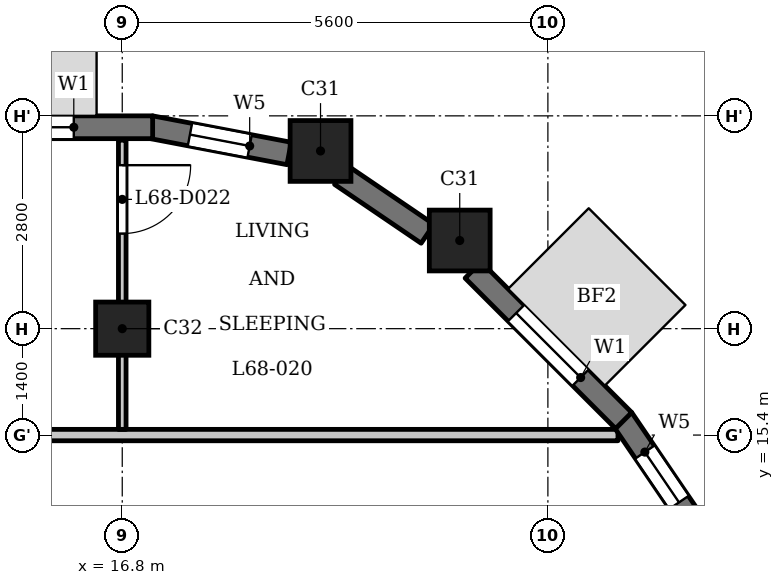
"""IFC4 building model, lengths in metres.
Left out: names, types, materials, properties, quantities, classifications, styles, units other than length and angle.
Written with IfcOpenShell. Run it as: python <this file> out.ifc"""

import sys

from ifc_helpers import new_model, si_unit, direction, frame, frame_2d, origin, origin_2d, place, context, subcontext, project, spatial, rectangle, extrude, element, fill, save


model = new_model("IFC4")
c1 = context("Model", 3, precision=1e-05, world=origin(), true_north=direction((0.0, 1.0)))
c2 = subcontext(c1, "Body", "Model", "MODEL_VIEW")
j1 = project(units=[si_unit("LENGTHUNIT", "METRE"), si_unit("PLANEANGLEUNIT", "RADIAN")], contexts=[c1])
p1 = place(None, origin())
s1 = spatial("IfcSite", under=j1, at=p1, CompositionType="ELEMENT")
p2 = place(p1, origin())
s2 = spatial("IfcBuilding", under=s1, at=p2, CompositionType="ELEMENT")
p3 = place(p2, frame((0.0, 0.0, 262.7)))
s3 = spatial("IfcBuildingStorey", under=s2, at=p3, CompositionType="ELEMENT", Elevation=262.7)
for number, where, z_axis, x_axis in (
    (1, (21.24, 17.96, 0.0), (0.0, 0.0, 1.0), (1.0, 0.0, 0.0)),
    (2, (19.409, 19.138, 0.0), (0.0, 0.0, 1.0), (1.0, 0.0, 0.0)),
):
    element("IfcColumn", number, at=place(p3, frame(where, z_axis=z_axis, x_axis=x_axis)), inside=s3, PredefinedType="COLUMN", context=c2, shape_type="SweptSolid", body=[
        extrude(rectangle(XDim=0.8, YDim=0.8, at=origin_2d()), origin(), (0.0, 0.0, 1.0), 3.5),
    ])
p4 = place(p3, frame((16.8, 16.8, 0.0), z_axis=(0.0, 0.0, 1.0), x_axis=(1.0, 0.0, 0.0)))
e3 = element("IfcColumn", 3, at=p4, inside=s3, PredefinedType="COLUMN", context=c2, shape_type="SweptSolid", body=[
    extrude(rectangle(XDim=0.7, YDim=0.7, at=origin_2d()), origin(), (0.0, 0.0, 1.0), 3.5),
])
p5 = place(p3, frame((24.422, 14.078, 0.0), z_axis=(0.0, 0.0, 1.0), x_axis=(-0.562054549384, 0.827100165347, 0.0)))
e4 = element("IfcWall", 4, at=p5, inside=s3, PredefinedType="SOLIDWALL", context=c2, shape_type="SweptSolid", body=[
    extrude(rectangle(XDim=1.856, YDim=0.3, at=frame_2d((0.928, 0.0))), origin(), (0.0, 0.0, 1.0), 2.55),
])
p6 = place(p5, frame((0.528, 0.0, 0.6)))
e5 = element("IfcOpeningElement", 5, at=p6, cuts=e4, PredefinedType="OPENING", context=c2, shape_type="SweptSolid", body=[
    extrude(rectangle(XDim=0.8, YDim=1.55, at=frame_2d((0.4, 0.775))), frame((0.0, 0.16, 0.0), z_axis=(0.0, -1.0, 0.0), x_axis=(1.0, 0.0, 0.0)), (0.0, 0.0, 1.0), 0.32),
])
p7 = place(p3, frame((23.397, 15.591, 0.0), z_axis=(0.0, 0.0, 1.0), x_axis=(-0.707150377276, 0.707063182409, 0.0)))
e6 = element("IfcWall", 6, at=p7, inside=s3, PredefinedType="SOLIDWALL", context=c2, shape_type="SweptSolid", body=[
    extrude(rectangle(XDim=2.8, YDim=0.3, at=frame_2d((1.4, 0.0))), origin(), (0.0, 0.0, 1.0), 2.55),
])
p8 = place(p7, frame((0.8, 0.0, 0.6)))
e7 = element("IfcOpeningElement", 7, at=p8, cuts=e6, PredefinedType="OPENING", context=c2, shape_type="SweptSolid", body=[
    extrude(rectangle(XDim=1.2, YDim=1.55, at=frame_2d((0.6, 0.775))), frame((0.0, 0.16, 0.0), z_axis=(0.0, -1.0, 0.0), x_axis=(1.0, 0.0, 0.0)), (0.0, 0.0, 1.0), 0.32),
])
p9 = place(p3, frame((20.817, 18.048, 0.0), z_axis=(0.0, 0.0, 1.0), x_axis=(-0.827025410886, 0.562164539747, 0.0)))
e8 = element("IfcWall", 8, at=p9, inside=s3, PredefinedType="SOLIDWALL", context=c2, shape_type="SweptSolid", body=[
    extrude(rectangle(XDim=1.377, YDim=0.3, at=frame_2d((0.688, 0.0))), origin(), (0.0, 0.0, 1.0), 2.55),
])
p10 = place(p3, frame((18.995, 19.105, 0.0), z_axis=(0.0, 0.0, 1.0), x_axis=(-0.982301706131, 0.187305520826, 0.0)))
e9 = element("IfcWall", 9, at=p10, inside=s3, PredefinedType="SOLIDWALL", context=c2, shape_type="SweptSolid", body=[
    extrude(rectangle(XDim=1.856, YDim=0.3, at=frame_2d((0.928, 0.0))), origin(), (0.0, 0.0, 1.0), 2.55),
])
p11 = place(p10, frame((0.528, 0.0, 0.6)))
e10 = element("IfcOpeningElement", 10, at=p11, cuts=e9, PredefinedType="OPENING", context=c2, shape_type="SweptSolid", body=[
    extrude(rectangle(XDim=0.8, YDim=1.55, at=frame_2d((0.4, 0.775))), frame((0.0, 0.16, 0.0), z_axis=(0.0, -1.0, 0.0), x_axis=(1.0, 0.0, 0.0)), (0.0, 0.0, 1.0), 0.32),
])
p12 = place(p3, frame((17.2, 19.45, 0.0), z_axis=(0.0, 0.0, 1.0), x_axis=(-1.0, 0.0, 0.0)))
e11 = element("IfcWall", 11, at=p12, inside=s3, PredefinedType="SOLIDWALL", context=c2, shape_type="SweptSolid", body=[
    extrude(rectangle(XDim=2.8, YDim=0.3, at=frame_2d((1.4, 0.0))), origin(), (0.0, 0.0, 1.0), 2.55),
])
p13 = place(p12, frame((1.038, 0.0, 0.6)))
e12 = element("IfcOpeningElement", 12, at=p13, cuts=e11, PredefinedType="OPENING", context=c2, shape_type="SweptSolid", body=[
    extrude(rectangle(XDim=1.2, YDim=1.55, at=frame_2d((0.6, 0.775))), frame((0.0, 0.16, 0.0), z_axis=(0.0, -1.0, 0.0), x_axis=(1.0, 0.0, 0.0)), (0.0, 0.0, 1.0), 0.32),
])
p14 = place(p3, frame((-23.55, 15.4, 0.0), z_axis=(0.0, 0.0, 1.0), x_axis=(1.0, 0.0, 0.0)))
e13 = element("IfcWall", 13, at=p14, inside=s3, PredefinedType="PARTITIONING", context=c2, shape_type="SweptSolid", body=[
    extrude(rectangle(XDim=46.872, YDim=0.15, at=frame_2d((23.436, 0.0))), origin(), (0.0, 0.0, 1.0), 3.2),
])
p15 = place(p14, frame((8.05, 0.0, 0.0)))
e14 = element("IfcOpeningElement", 14, at=p15, cuts=e13, PredefinedType="OPENING", context=c2, shape_type="SweptSolid", body=[
    extrude(rectangle(XDim=1.0, YDim=2.1, at=frame_2d((0.5, 1.05))), frame((0.0, 0.085, 0.0), z_axis=(0.0, -1.0, 0.0), x_axis=(1.0, 0.0, 0.0)), (0.0, 0.0, 1.0), 0.17),
])
p16 = place(p14, frame((15.05, 0.0, 0.0)))
e15 = element("IfcOpeningElement", 15, at=p16, cuts=e13, PredefinedType="OPENING", context=c2, shape_type="SweptSolid", body=[
    extrude(rectangle(XDim=1.0, YDim=2.1, at=frame_2d((0.5, 1.05))), frame((0.0, 0.085, 0.0), z_axis=(0.0, -1.0, 0.0), x_axis=(1.0, 0.0, 0.0)), (0.0, 0.0, 1.0), 0.17),
])
p17 = place(p14, frame((26.25, 0.0, 0.0)))
e16 = element("IfcOpeningElement", 16, at=p17, cuts=e13, PredefinedType="OPENING", context=c2, shape_type="SweptSolid", body=[
    extrude(rectangle(XDim=1.0, YDim=2.1, at=frame_2d((0.5, 1.05))), frame((0.0, 0.085, 0.0), z_axis=(0.0, -1.0, 0.0), x_axis=(1.0, 0.0, 0.0)), (0.0, 0.0, 1.0), 0.17),
])
p18 = place(p14, frame((38.2, 0.0, 0.0)))
e17 = element("IfcOpeningElement", 17, at=p18, cuts=e13, PredefinedType="OPENING", context=c2, shape_type="SweptSolid", body=[
    extrude(rectangle(XDim=1.0, YDim=2.1, at=frame_2d((0.5, 1.05))), frame((0.0, 0.085, 0.0), z_axis=(0.0, -1.0, 0.0), x_axis=(1.0, 0.0, 0.0)), (0.0, 0.0, 1.0), 0.17),
])
p19 = place(p3, frame((16.8, 15.475, 0.0), z_axis=(0.0, 0.0, 1.0), x_axis=(0.0, 1.0, 0.0)))
e18 = element("IfcWall", 18, at=p19, inside=s3, PredefinedType="PARTITIONING", context=c2, shape_type="SweptSolid", body=[
    extrude(rectangle(XDim=3.805, YDim=0.1, at=frame_2d((1.902, 0.0))), origin(), (0.0, 0.0, 1.0), 3.2),
])
p20 = place(p19, frame((2.576, 0.0, 0.0)))
e19 = element("IfcOpeningElement", 19, at=p20, cuts=e18, PredefinedType="OPENING", context=c2, shape_type="SweptSolid", body=[
    extrude(rectangle(XDim=0.9, YDim=2.1, at=frame_2d((0.45, 1.05))), frame((0.0, 0.06, 0.0), z_axis=(0.0, -1.0, 0.0), x_axis=(1.0, 0.0, 0.0)), (0.0, 0.0, 1.0), 0.12),
])
p21 = place(p20, origin())
e20 = element("IfcDoor", 20, at=p21, inside=s3, OperationType="SINGLE_SWING_RIGHT", PredefinedType="DOOR", context=c2, shape_type="SweptSolid", body=[
    extrude(rectangle(XDim=0.9, YDim=2.1, at=frame_2d((0.45, 1.05))), frame((0.0, 0.025, 0.0), z_axis=(0.0, -1.0, 0.0), x_axis=(1.0, 0.0, 0.0)), (0.0, 0.0, 1.0), 0.05),
])
fill(e19, e20)
p22 = place(p6, origin())
e21 = element("IfcWindow", 21, at=p22, inside=s3, PartitioningType="SINGLE_PANEL", PredefinedType="WINDOW", context=c2, shape_type="SweptSolid", body=[
    extrude(rectangle(XDim=0.8, YDim=1.55, at=frame_2d((0.4, 0.775))), frame((0.0, 0.03, 0.0), z_axis=(0.0, -1.0, 0.0), x_axis=(1.0, 0.0, 0.0)), (0.0, 0.0, 1.0), 0.06),
])
fill(e5, e21)
p23 = place(p8, origin())
e22 = element("IfcWindow", 22, at=p23, inside=s3, PartitioningType="SINGLE_PANEL", PredefinedType="WINDOW", context=c2, shape_type="SweptSolid", body=[
    extrude(rectangle(XDim=1.2, YDim=1.55, at=frame_2d((0.6, 0.775))), frame((0.0, 0.03, 0.0), z_axis=(0.0, -1.0, 0.0), x_axis=(1.0, 0.0, 0.0)), (0.0, 0.0, 1.0), 0.06),
])
fill(e7, e22)
p24 = place(p11, origin())
e23 = element("IfcWindow", 23, at=p24, inside=s3, PartitioningType="SINGLE_PANEL", PredefinedType="WINDOW", context=c2, shape_type="SweptSolid", body=[
    extrude(rectangle(XDim=0.8, YDim=1.55, at=frame_2d((0.4, 0.775))), frame((0.0, 0.03, 0.0), z_axis=(0.0, -1.0, 0.0), x_axis=(1.0, 0.0, 0.0)), (0.0, 0.0, 1.0), 0.06),
])
fill(e10, e23)
p25 = place(p13, origin())
e24 = element("IfcWindow", 24, at=p25, inside=s3, PartitioningType="SINGLE_PANEL", PredefinedType="WINDOW", context=c2, shape_type="SweptSolid", body=[
    extrude(rectangle(XDim=1.2, YDim=1.55, at=frame_2d((0.6, 0.775))), frame((0.0, 0.03, 0.0), z_axis=(0.0, -1.0, 0.0), x_axis=(1.0, 0.0, 0.0)), (0.0, 0.0, 1.0), 0.06),
])
fill(e12, e24)
save(model, sys.argv[1])
